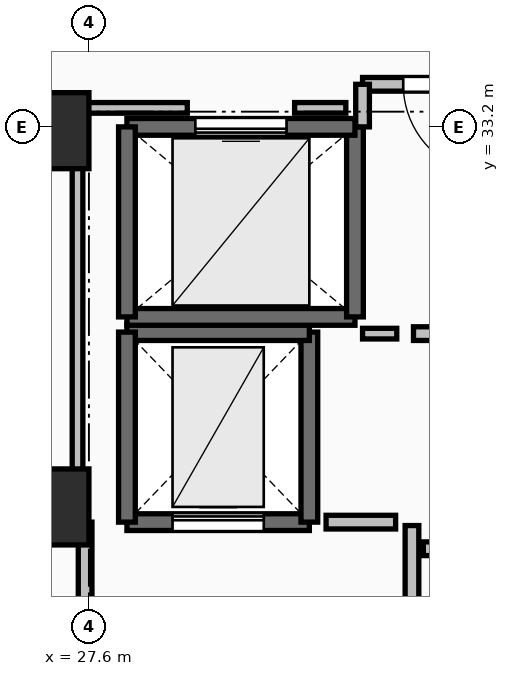
"""IFC4 building model, lengths in metres.
Left out: names, types, materials, properties, quantities, classifications, styles, units other than length and angle.
Written with IfcOpenShell. Run it as: python <this file> out.ifc"""

import sys

from ifc_helpers import new_model, si_unit, direction, frame, frame_2d, origin, origin_2d, place, context, subcontext, project, spatial, rectangle, extrude, element, fill, save


model = new_model("IFC4")
c1 = context("Model", 3, precision=1e-05, world=origin(), true_north=direction((0.0, 1.0)))
c2 = subcontext(c1, "Body", "Model", "MODEL_VIEW")
j1 = project(units=[si_unit("LENGTHUNIT", "METRE"), si_unit("PLANEANGLEUNIT", "RADIAN")], contexts=[c1])
p1 = place(None, origin())
s1 = spatial("IfcSite", under=j1, at=p1, CompositionType="ELEMENT")
p2 = place(p1, origin())
s2 = spatial("IfcBuilding", under=s1, at=p2, CompositionType="ELEMENT")
p3 = place(p2, frame((0.0, 0.0, 234.25)))
s3 = spatial("IfcBuildingStorey", under=s2, at=p3, CompositionType="ELEMENT", Elevation=234.25)
for number, where, z_axis, x_axis in (
    (1, (27.25, 28.2, 0.0), (0.0, 0.0, 1.0), (1.0, 0.0, 0.0)),
    (2, (27.25, 33.15, 0.0), (0.0, 0.0, 1.0), (1.0, 0.0, 0.0)),
):
    element("IfcColumn", number, at=place(p3, frame(where, z_axis=z_axis, x_axis=x_axis)), inside=s3, PredefinedType="PILASTER", context=c2, shape_type="SweptSolid", body=[
        extrude(rectangle(XDim=0.7, YDim=1.0, at=origin_2d()), origin(), (0.0, 0.0, 1.0), 3.55),
    ])
p4 = place(p3, frame((28.1, 28.0, 0.0), z_axis=(0.0, 0.0, 1.0), x_axis=(1.0, 0.0, 0.0)))
e3 = element("IfcWall", 3, at=p4, inside=s3, PredefinedType="SHEAR", context=c2, shape_type="SweptSolid", body=[
    extrude(rectangle(XDim=2.4, YDim=0.22, at=frame_2d((1.2, 0.0))), origin(), (0.0, 0.0, 1.0), 3.29),
])
p5 = place(p4, frame((0.6, 0.0, 0.0)))
e4 = element("IfcOpeningElement", 4, at=p5, cuts=e3, PredefinedType="OPENING", context=c2, shape_type="SweptSolid", body=[
    extrude(rectangle(XDim=1.2, YDim=2.2, at=frame_2d((0.6, 1.1))), frame((0.0, 0.125, 0.0), z_axis=(0.0, -1.0, 0.0), x_axis=(1.0, 0.0, 0.0)), (0.0, 0.0, 1.0), 0.25),
])
p6 = place(p3, frame((30.5, 28.0, 0.0), z_axis=(0.0, 0.0, 1.0), x_axis=(0.0, 1.0, 0.0)))
e5 = element("IfcWall", 5, at=p6, inside=s3, PredefinedType="SHEAR", context=c2, shape_type="SweptSolid", body=[
    extrude(rectangle(XDim=2.5, YDim=0.22, at=frame_2d((1.25, 0.0))), origin(), (0.0, 0.0, 1.0), 3.29),
])
p7 = place(p3, frame((30.5, 30.5, 0.0), z_axis=(0.0, 0.0, 1.0), x_axis=(-1.0, 0.0, 0.0)))
e6 = element("IfcWall", 6, at=p7, inside=s3, PredefinedType="SHEAR", context=c2, shape_type="SweptSolid", body=[
    extrude(rectangle(XDim=2.4, YDim=0.22, at=frame_2d((1.2, 0.0))), origin(), (0.0, 0.0, 1.0), 3.29),
])
p8 = place(p3, frame((28.1, 30.5, 0.0), z_axis=(0.0, 0.0, 1.0), x_axis=(0.0, -1.0, 0.0)))
e7 = element("IfcWall", 7, at=p8, inside=s3, PredefinedType="SHEAR", context=c2, shape_type="SweptSolid", body=[
    extrude(rectangle(XDim=2.5, YDim=0.22, at=frame_2d((1.25, 0.0))), origin(), (0.0, 0.0, 1.0), 3.29),
])
p9 = place(p3, frame((28.1, 30.7, 0.0), z_axis=(0.0, 0.0, 1.0), x_axis=(1.0, 0.0, 0.0)))
e8 = element("IfcWall", 8, at=p9, inside=s3, PredefinedType="SOLIDWALL", context=c2, shape_type="SweptSolid", body=[
    extrude(rectangle(XDim=3.0, YDim=0.22, at=frame_2d((1.5, 0.0))), origin(), (0.0, 0.0, 1.0), 3.29),
])
p10 = place(p3, frame((31.1, 30.7, 0.0), z_axis=(0.0, 0.0, 1.0), x_axis=(0.0, 1.0, 0.0)))
e9 = element("IfcWall", 9, at=p10, inside=s3, PredefinedType="SOLIDWALL", context=c2, shape_type="SweptSolid", body=[
    extrude(rectangle(XDim=2.5, YDim=0.22, at=frame_2d((1.25, 0.0))), origin(), (0.0, 0.0, 1.0), 3.29),
])
p11 = place(p3, frame((31.1, 33.2, 0.0), z_axis=(0.0, 0.0, 1.0), x_axis=(-1.0, 0.0, 0.0)))
e10 = element("IfcWall", 10, at=p11, inside=s3, PredefinedType="SOLIDWALL", context=c2, shape_type="SweptSolid", body=[
    extrude(rectangle(XDim=3.0, YDim=0.22, at=frame_2d((1.5, 0.0))), origin(), (0.0, 0.0, 1.0), 3.29),
])
p12 = place(p11, frame((0.9, 0.0, 0.0)))
e11 = element("IfcOpeningElement", 11, at=p12, cuts=e10, PredefinedType="OPENING", context=c2, shape_type="SweptSolid", body=[
    extrude(rectangle(XDim=1.2, YDim=2.2, at=frame_2d((0.6, 1.1))), frame((0.0, 0.125, 0.0), z_axis=(0.0, -1.0, 0.0), x_axis=(1.0, 0.0, 0.0)), (0.0, 0.0, 1.0), 0.25),
])
p13 = place(p3, frame((28.1, 33.2, 0.0), z_axis=(0.0, 0.0, 1.0), x_axis=(0.0, -1.0, 0.0)))
e12 = element("IfcWall", 12, at=p13, inside=s3, PredefinedType="SOLIDWALL", context=c2, shape_type="SweptSolid", body=[
    extrude(rectangle(XDim=2.5, YDim=0.22, at=frame_2d((1.25, 0.0))), origin(), (0.0, 0.0, 1.0), 3.29),
])
p14 = place(p3, frame((31.85, 24.045, 0.0), z_axis=(0.0, 0.0, 1.0), x_axis=(0.0, 1.0, 0.0)))
e13 = element("IfcWall", 13, at=p14, inside=s3, PredefinedType="PARTITIONING", context=c2, shape_type="SweptSolid", body=[
    extrude(rectangle(XDim=3.91, YDim=0.18, at=frame_2d((1.955, 0.0))), origin(), (0.0, 0.0, 1.0), 3.29),
])
p15 = place(p14, frame((1.355, 0.0, 0.0)))
e14 = element("IfcOpeningElement", 14, at=p15, cuts=e13, PredefinedType="OPENING", context=c2, shape_type="SweptSolid", body=[
    extrude(rectangle(XDim=1.2, YDim=2.15, at=frame_2d((0.6, 1.075))), frame((0.0, 0.105, 0.0), z_axis=(0.0, -1.0, 0.0), x_axis=(1.0, 0.0, 0.0)), (0.0, 0.0, 1.0), 0.21),
])
p16 = place(p3, frame((27.55, 28.0, 0.0), z_axis=(0.0, 0.0, 1.0), x_axis=(0.0, -1.0, 0.0)))
e15 = element("IfcWall", 15, at=p16, inside=s3, PredefinedType="PARTITIONING", context=c2, shape_type="SweptSolid", body=[
    extrude(rectangle(XDim=4.05, YDim=0.18, at=frame_2d((2.025, 0.0))), origin(), (0.0, 0.0, 1.0), 3.29),
])
p17 = place(p16, frame((1.425, 0.0, 0.0)))
e16 = element("IfcOpeningElement", 16, at=p17, cuts=e15, PredefinedType="OPENING", context=c2, shape_type="SweptSolid", body=[
    extrude(rectangle(XDim=1.2, YDim=2.15, at=frame_2d((0.6, 1.075))), frame((0.0, 0.105, 0.0), z_axis=(0.0, -1.0, 0.0), x_axis=(1.0, 0.0, 0.0)), (0.0, 0.0, 1.0), 0.21),
])
p18 = place(p3, frame((31.87, 30.48, 0.0), z_axis=(0.0, 0.0, 1.0), x_axis=(1.0, 0.0, 0.0)))
e17 = element("IfcWall", 17, at=p18, inside=s3, PredefinedType="PARTITIONING", context=c2, shape_type="SweptSolid", body=[
    extrude(rectangle(XDim=1.6, YDim=0.18, at=frame_2d((0.8, 0.0))), origin(), (0.0, 0.0, 1.0), 3.29),
])
p19 = place(p3, frame((33.47, 33.76, 0.0), z_axis=(0.0, 0.0, 1.0), x_axis=(-1.0, 0.0, 0.0)))
e18 = element("IfcWall", 18, at=p19, inside=s3, PredefinedType="PARTITIONING", context=c2, shape_type="SweptSolid", body=[
    extrude(rectangle(XDim=2.27, YDim=0.18, at=frame_2d((1.135, 0.0))), origin(), (0.0, 0.0, 1.0), 3.29),
])
p20 = place(p19, frame((0.535, 0.0, 0.0)))
e19 = element("IfcOpeningElement", 19, at=p20, cuts=e18, PredefinedType="OPENING", context=c2, shape_type="SweptSolid", body=[
    extrude(rectangle(XDim=1.2, YDim=2.15, at=frame_2d((0.6, 1.075))), frame((0.0, 0.105, 0.0), z_axis=(0.0, -1.0, 0.0), x_axis=(1.0, 0.0, 0.0)), (0.0, 0.0, 1.0), 0.21),
])
p21 = place(p3, frame((31.2, 33.76, 0.0), z_axis=(0.0, 0.0, 1.0), x_axis=(0.0, -1.0, 0.0)))
e20 = element("IfcWall", 20, at=p21, inside=s3, PredefinedType="PARTITIONING", context=c2, shape_type="SweptSolid", body=[
    extrude(rectangle(XDim=0.56, YDim=0.18, at=frame_2d((0.28, 0.0))), origin(), (0.0, 0.0, 1.0), 3.29),
])
p22 = place(p3, frame((35.04, 27.65, 0.0), z_axis=(0.0, 0.0, 1.0), x_axis=(-1.0, 0.0, 0.0)))
e21 = element("IfcWall", 21, at=p22, inside=s3, PredefinedType="PARTITIONING", context=c2, shape_type="SweptSolid", body=[
    extrude(rectangle(XDim=3.04, YDim=0.18, at=frame_2d((1.52, 0.0))), origin(), (0.0, 0.0, 1.0), 3.29),
])
p23 = place(p22, frame((1.02, 0.0, 0.0)))
e22 = element("IfcOpeningElement", 22, at=p23, cuts=e21, PredefinedType="OPENING", context=c2, shape_type="SweptSolid", body=[
    extrude(rectangle(XDim=1.0, YDim=2.15, at=frame_2d((0.5, 1.075))), frame((0.0, 0.105, 0.0), z_axis=(0.0, -1.0, 0.0), x_axis=(1.0, 0.0, 0.0)), (0.0, 0.0, 1.0), 0.21),
])
p24 = place(p3, frame((31.635, 28.0, 0.0), z_axis=(0.0, 0.0, 1.0), x_axis=(-1.0, 0.0, 0.0)))
e23 = element("IfcWall", 23, at=p24, inside=s3, PredefinedType="PARTITIONING", context=c2, shape_type="SweptSolid", body=[
    extrude(rectangle(XDim=0.915, YDim=0.18, at=frame_2d((0.458, 0.0))), origin(), (0.0, 0.0, 1.0), 3.29),
])
p25 = place(p3, frame((31.2, 30.48, 0.0), z_axis=(0.0, 0.0, 1.0), x_axis=(1.0, 0.0, 0.0)))
e24 = element("IfcWall", 24, at=p25, inside=s3, PredefinedType="PARTITIONING", context=c2, shape_type="SweptSolid", body=[
    extrude(rectangle(XDim=0.45, YDim=0.14, at=frame_2d((0.225, 0.0))), origin(), (0.0, 0.0, 1.0), 3.29),
])
p26 = place(p3, frame((30.98, 33.45, 0.0), z_axis=(0.0, 0.0, 1.0), x_axis=(-1.0, 0.0, 0.0)))
e25 = element("IfcWall", 25, at=p26, inside=s3, PredefinedType="PARTITIONING", context=c2, shape_type="SweptSolid", body=[
    extrude(rectangle(XDim=0.674, YDim=0.14, at=frame_2d((0.337, 0.0))), origin(), (0.0, 0.0, 1.0), 3.29),
])
p27 = place(p3, frame((28.894, 33.45, 0.0), z_axis=(0.0, 0.0, 1.0), x_axis=(-1.0, 0.0, 0.0)))
e26 = element("IfcWall", 26, at=p27, inside=s3, PredefinedType="PARTITIONING", context=c2, shape_type="SweptSolid", body=[
    extrude(rectangle(XDim=1.444, YDim=0.14, at=frame_2d((0.722, 0.0))), origin(), (0.0, 0.0, 1.0), 2.482),
])
p28 = place(p3, frame((27.45, 33.45, 0.0), z_axis=(0.0, 0.0, 1.0), x_axis=(0.0, -1.0, 0.0)))
e27 = element("IfcWall", 27, at=p28, inside=s3, PredefinedType="PARTITIONING", context=c2, shape_type="SweptSolid", body=[
    extrude(rectangle(XDim=5.254, YDim=0.14, at=frame_2d((2.627, 0.0))), origin(), (0.0, 0.0, 1.0), 2.482),
])
p29 = place(p5, origin())
e28 = element("IfcDoor", 28, at=p29, inside=s3, OperationType="SLIDING_TO_LEFT", PredefinedType="DOOR", context=c2, shape_type="SweptSolid", body=[
    extrude(rectangle(XDim=1.2, YDim=2.2, at=frame_2d((0.6, 1.1))), frame((0.0, 0.025, 0.0), z_axis=(0.0, -1.0, 0.0), x_axis=(1.0, 0.0, 0.0)), (0.0, 0.0, 1.0), 0.05),
])
fill(e4, e28)
p30 = place(p12, origin())
e29 = element("IfcDoor", 29, at=p30, inside=s3, OperationType="SLIDING_TO_LEFT", PredefinedType="DOOR", context=c2, shape_type="SweptSolid", body=[
    extrude(rectangle(XDim=1.2, YDim=2.2, at=frame_2d((0.6, 1.1))), frame((0.0, 0.025, 0.0), z_axis=(0.0, -1.0, 0.0), x_axis=(1.0, 0.0, 0.0)), (0.0, 0.0, 1.0), 0.05),
])
fill(e11, e29)
p31 = place(p20, origin())
e30 = element("IfcDoor", 30, at=p31, inside=s3, OperationType="SINGLE_SWING_LEFT", PredefinedType="DOOR", context=c2, shape_type="SweptSolid", body=[
    extrude(rectangle(XDim=1.2, YDim=2.15, at=frame_2d((0.6, 1.075))), frame((0.0, 0.025, 0.0), z_axis=(0.0, -1.0, 0.0), x_axis=(1.0, 0.0, 0.0)), (0.0, 0.0, 1.0), 0.05),
])
fill(e19, e30)
save(model, sys.argv[1])
